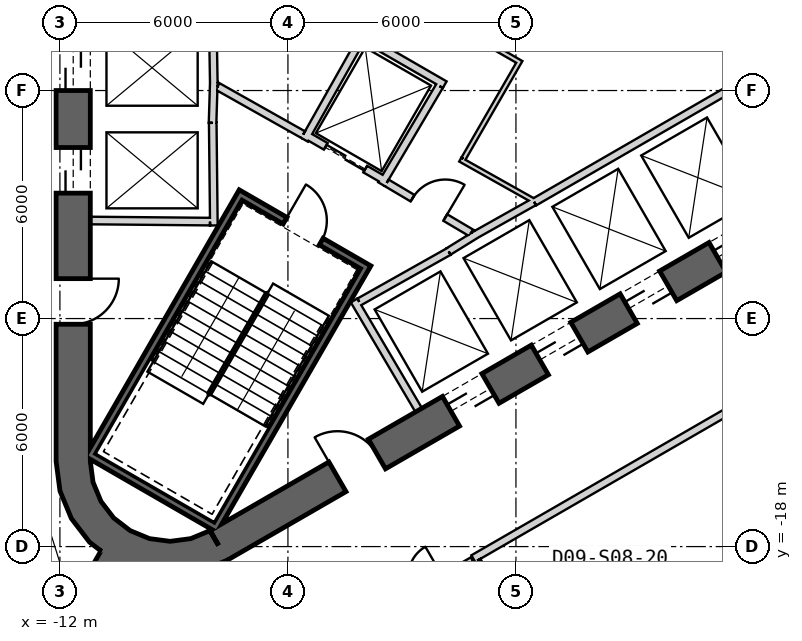
"""IFC4 building model, lengths in metres.
Left out: names, types, materials, properties, quantities, classifications, styles, units other than length and angle.
Written with IfcOpenShell. Run it as: python <this file> out.ifc"""

import sys

from ifc_helpers import new_model, si_unit, direction, frame, frame_2d, origin, place, context, subcontext, project, spatial, polyline, rectangle, outline, extrude, element, fill, save


model = new_model("IFC4")
c1 = context("Model", 3, precision=1e-05, world=origin(), true_north=direction((0.0, 1.0)))
c2 = subcontext(c1, "Body", "Model", "MODEL_VIEW")
j1 = project(units=[si_unit("LENGTHUNIT", "METRE"), si_unit("PLANEANGLEUNIT", "RADIAN")], contexts=[c1])
p1 = place(None, origin())
s1 = spatial("IfcSite", under=j1, at=p1, CompositionType="ELEMENT")
p2 = place(p1, origin())
s2 = spatial("IfcBuilding", under=s1, at=p2, CompositionType="ELEMENT")
p3 = place(p2, frame((0.0, 0.0, 143.9)))
s3 = spatial("IfcBuildingStorey", under=s2, at=p3, CompositionType="ELEMENT", Elevation=143.9)
p4 = place(p3, frame((-11.65, 15.762, 0.0), z_axis=(0.0, 0.0, 1.0), x_axis=(0.0, -1.0, 0.0)))
e1 = element("IfcWall", 1, at=p4, inside=s3, PredefinedType="SHEAR", context=c2, shape_type="SweptSolid", body=[
    extrude(rectangle(XDim=31.523, YDim=0.9, at=frame_2d((15.762, 0.0))), origin(), (0.0, 0.0, 1.0), 4.1),
])
p5 = place(p4, frame((7.062, 0.0, 0.0)))
e2 = element("IfcOpeningElement", 2, at=p5, cuts=e1, PredefinedType="OPENING", context=c2, shape_type="SweptSolid", body=[
    extrude(rectangle(XDim=1.2, YDim=2.4, at=frame_2d((0.6, 1.2))), frame((0.0, 0.46, 0.0), z_axis=(0.0, -1.0, 0.0), x_axis=(1.0, 0.0, 0.0)), (0.0, 0.0, 1.0), 0.92),
])
p6 = place(p4, frame((9.762, 0.0, 0.0)))
e3 = element("IfcOpeningElement", 3, at=p6, cuts=e1, PredefinedType="OPENING", context=c2, shape_type="SweptSolid", body=[
    extrude(rectangle(XDim=1.2, YDim=2.4, at=frame_2d((0.6, 1.2))), frame((0.0, 0.46, 0.0), z_axis=(0.0, -1.0, 0.0), x_axis=(1.0, 0.0, 0.0)), (0.0, 0.0, 1.0), 0.92),
])
p7 = place(p4, frame((12.462, 0.0, 0.0)))
e4 = element("IfcOpeningElement", 4, at=p7, cuts=e1, PredefinedType="OPENING", context=c2, shape_type="SweptSolid", body=[
    extrude(rectangle(XDim=1.2, YDim=2.4, at=frame_2d((0.6, 1.2))), frame((0.0, 0.46, 0.0), z_axis=(0.0, -1.0, 0.0), x_axis=(1.0, 0.0, 0.0)), (0.0, 0.0, 1.0), 0.92),
])
p8 = place(p4, frame((15.162, 0.0, 0.0)))
e5 = element("IfcOpeningElement", 5, at=p8, cuts=e1, PredefinedType="OPENING", context=c2, shape_type="SweptSolid", body=[
    extrude(rectangle(XDim=1.2, YDim=2.4, at=frame_2d((0.6, 1.2))), frame((0.0, 0.46, 0.0), z_axis=(0.0, -1.0, 0.0), x_axis=(1.0, 0.0, 0.0)), (0.0, 0.0, 1.0), 0.92),
])
p9 = place(p4, frame((17.862, 0.0, 0.0)))
e6 = element("IfcOpeningElement", 6, at=p9, cuts=e1, PredefinedType="OPENING", context=c2, shape_type="SweptSolid", body=[
    extrude(rectangle(XDim=1.2, YDim=2.4, at=frame_2d((0.6, 1.2))), frame((0.0, 0.46, 0.0), z_axis=(0.0, -1.0, 0.0), x_axis=(1.0, 0.0, 0.0)), (0.0, 0.0, 1.0), 0.92),
])
p10 = place(p4, frame((20.562, 0.0, 0.0)))
e7 = element("IfcOpeningElement", 7, at=p10, cuts=e1, PredefinedType="OPENING", context=c2, shape_type="SweptSolid", body=[
    extrude(rectangle(XDim=1.2, YDim=2.4, at=frame_2d((0.6, 1.2))), frame((0.0, 0.46, 0.0), z_axis=(0.0, -1.0, 0.0), x_axis=(1.0, 0.0, 0.0)), (0.0, 0.0, 1.0), 0.92),
])
p11 = place(p4, frame((23.262, 0.0, 0.0)))
e8 = element("IfcOpeningElement", 8, at=p11, cuts=e1, PredefinedType="OPENING", context=c2, shape_type="SweptSolid", body=[
    extrude(rectangle(XDim=1.2, YDim=2.4, at=frame_2d((0.6, 1.2))), frame((0.0, 0.46, 0.0), z_axis=(0.0, -1.0, 0.0), x_axis=(1.0, 0.0, 0.0)), (0.0, 0.0, 1.0), 0.92),
])
p12 = place(p4, frame((3.612, 0.0, 0.0)))
e9 = element("IfcOpeningElement", 9, at=p12, cuts=e1, PredefinedType="OPENING", context=c2, shape_type="SweptSolid", body=[
    extrude(rectangle(XDim=1.2, YDim=2.4, at=frame_2d((0.6, 1.2))), frame((0.0, 0.46, 0.0), z_axis=(0.0, -1.0, 0.0), x_axis=(1.0, 0.0, 0.0)), (0.0, 0.0, 1.0), 0.92),
])
p13 = place(p4, frame((26.712, 0.0, 0.0)))
e10 = element("IfcOpeningElement", 10, at=p13, cuts=e1, PredefinedType="OPENING", context=c2, shape_type="SweptSolid", body=[
    extrude(rectangle(XDim=1.2, YDim=2.4, at=frame_2d((0.6, 1.2))), frame((0.0, 0.46, 0.0), z_axis=(0.0, -1.0, 0.0), x_axis=(1.0, 0.0, 0.0)), (0.0, 0.0, 1.0), 0.92),
])
p14 = place(p3, frame((-7.825, -17.97, 0.0), z_axis=(0.0, 0.0, 1.0), x_axis=(0.866028369851, 0.499994862586, 0.0)))
e11 = element("IfcWall", 11, at=p14, inside=s3, PredefinedType="SHEAR", context=c2, shape_type="SweptSolid", body=[
    extrude(rectangle(XDim=31.523, YDim=0.9, at=frame_2d((15.762, 0.0))), origin(), (0.0, 0.0, 1.0), 4.1),
])
p15 = place(p14, frame((7.062, 0.0, 0.0)))
e12 = element("IfcOpeningElement", 12, at=p15, cuts=e11, PredefinedType="OPENING", context=c2, shape_type="SweptSolid", body=[
    extrude(rectangle(XDim=1.2, YDim=2.4, at=frame_2d((0.6, 1.2))), frame((0.0, 0.46, 0.0), z_axis=(0.0, -1.0, 0.0), x_axis=(1.0, 0.0, 0.0)), (0.0, 0.0, 1.0), 0.92),
])
p16 = place(p14, frame((9.762, 0.0, 0.0)))
e13 = element("IfcOpeningElement", 13, at=p16, cuts=e11, PredefinedType="OPENING", context=c2, shape_type="SweptSolid", body=[
    extrude(rectangle(XDim=1.2, YDim=2.4, at=frame_2d((0.6, 1.2))), frame((0.0, 0.46, 0.0), z_axis=(0.0, -1.0, 0.0), x_axis=(1.0, 0.0, 0.0)), (0.0, 0.0, 1.0), 0.92),
])
p17 = place(p14, frame((12.462, 0.0, 0.0)))
e14 = element("IfcOpeningElement", 14, at=p17, cuts=e11, PredefinedType="OPENING", context=c2, shape_type="SweptSolid", body=[
    extrude(rectangle(XDim=1.2, YDim=2.4, at=frame_2d((0.6, 1.2))), frame((0.0, 0.46, 0.0), z_axis=(0.0, -1.0, 0.0), x_axis=(1.0, 0.0, 0.0)), (0.0, 0.0, 1.0), 0.92),
])
p18 = place(p14, frame((15.162, 0.0, 0.0)))
e15 = element("IfcOpeningElement", 15, at=p18, cuts=e11, PredefinedType="OPENING", context=c2, shape_type="SweptSolid", body=[
    extrude(rectangle(XDim=1.2, YDim=2.4, at=frame_2d((0.6, 1.2))), frame((0.0, 0.46, 0.0), z_axis=(0.0, -1.0, 0.0), x_axis=(1.0, 0.0, 0.0)), (0.0, 0.0, 1.0), 0.92),
])
p19 = place(p14, frame((17.862, 0.0, 0.0)))
e16 = element("IfcOpeningElement", 16, at=p19, cuts=e11, PredefinedType="OPENING", context=c2, shape_type="SweptSolid", body=[
    extrude(rectangle(XDim=1.2, YDim=2.4, at=frame_2d((0.6, 1.2))), frame((0.0, 0.46, 0.0), z_axis=(0.0, -1.0, 0.0), x_axis=(1.0, 0.0, 0.0)), (0.0, 0.0, 1.0), 0.92),
])
p20 = place(p14, frame((20.562, 0.0, 0.0)))
e17 = element("IfcOpeningElement", 17, at=p20, cuts=e11, PredefinedType="OPENING", context=c2, shape_type="SweptSolid", body=[
    extrude(rectangle(XDim=1.2, YDim=2.4, at=frame_2d((0.6, 1.2))), frame((0.0, 0.46, 0.0), z_axis=(0.0, -1.0, 0.0), x_axis=(1.0, 0.0, 0.0)), (0.0, 0.0, 1.0), 0.92),
])
p21 = place(p14, frame((26.712, 0.0, 0.0)))
e18 = element("IfcOpeningElement", 18, at=p21, cuts=e11, PredefinedType="OPENING", context=c2, shape_type="SweptSolid", body=[
    extrude(rectangle(XDim=1.2, YDim=2.4, at=frame_2d((0.6, 1.2))), frame((0.0, 0.46, 0.0), z_axis=(0.0, -1.0, 0.0), x_axis=(1.0, 0.0, 0.0)), (0.0, 0.0, 1.0), 0.92),
])
p22 = place(p14, frame((3.612, 0.0, 0.0)))
e19 = element("IfcOpeningElement", 19, at=p22, cuts=e11, PredefinedType="OPENING", context=c2, shape_type="SweptSolid", body=[
    extrude(rectangle(XDim=1.2, YDim=2.4, at=frame_2d((0.6, 1.2))), frame((0.0, 0.46, 0.0), z_axis=(0.0, -1.0, 0.0), x_axis=(1.0, 0.0, 0.0)), (0.0, 0.0, 1.0), 0.92),
])
p23 = place(p3, origin())
e20 = element("IfcWall", 20, at=p23, inside=s3, PredefinedType="SHEAR", context=c2, shape_type="SweptSolid", body=[
    extrude(outline(polyline([(-12.1, -15.762), (-11.998, -16.538), (-11.698, -17.262), (-11.221, -17.883), (-10.6, -18.36), (-9.876, -18.659), (-9.1, -18.762), (-8.323, -18.659), (-7.6, -18.36), (-8.05, -17.58), (-8.556, -17.79), (-9.1, -17.862), (-9.644, -17.79), (-10.15, -17.58), (-10.585, -17.247), (-10.919, -16.812), (-11.128, -16.305), (-11.2, -15.762), (-12.1, -15.762)])), origin(), (0.0, 0.0, 1.0), 4.1),
])
p24 = place(p3, frame((-10.575, -18.316, 0.0), z_axis=(0.0, 0.0, 1.0), x_axis=(-0.500002326941, -0.86602406032, 0.0)))
e21 = element("IfcWall", 21, at=p24, inside=s3, PredefinedType="SHEAR", context=c2, shape_type="SweptSolid", body=[
    extrude(rectangle(XDim=12.384, YDim=0.8, at=frame_2d((6.192, 0.0))), origin(), (0.0, 0.0, 1.0), 4.1),
])
p25 = place(p24, frame((1.25, 0.0, 0.0)))
e22 = element("IfcOpeningElement", 22, at=p25, cuts=e21, PredefinedType="OPENING", context=c2, shape_type="SweptSolid", body=[
    extrude(rectangle(XDim=1.4, YDim=2.4, at=frame_2d((0.7, 1.2))), frame((0.0, 0.41, 0.0), z_axis=(0.0, -1.0, 0.0), x_axis=(1.0, 0.0, 0.0)), (0.0, 0.0, 1.0), 0.82),
])
p26 = place(p3, frame((-7.95, -5.772, 0.0), z_axis=(0.0, 0.0, 1.0), x_axis=(-0.030803413295, -0.999525462272, 0.0)))
e23 = element("IfcWall", 23, at=p26, inside=s3, PredefinedType="PLUMBINGWALL", context=c2, shape_type="SweptSolid", body=[
    extrude(rectangle(XDim=1.078, YDim=0.2, at=frame_2d((0.539, 0.0))), origin(), (0.0, 0.0, 1.0), 3.8),
])
p27 = place(p3, frame((-7.98, -4.05, 0.0), z_axis=(0.0, 0.0, 1.0), x_axis=(0.016809909365, -0.999858703491, 0.0)))
e24 = element("IfcWall", 24, at=p27, inside=s3, PredefinedType="PLUMBINGWALL", context=c2, shape_type="SweptSolid", body=[
    extrude(rectangle(XDim=1.844, YDim=0.2, at=frame_2d((0.922, 0.0))), origin(), (0.0, 0.0, 1.0), 3.8),
])
p28 = place(p3, frame((-7.979, -6.85, 0.0), z_axis=(0.0, 0.0, 1.0), x_axis=(0.011121475088, -0.999938154483, 0.0)))
e25 = element("IfcWall", 25, at=p28, inside=s3, PredefinedType="PLUMBINGWALL", context=c2, shape_type="SweptSolid", body=[
    extrude(rectangle(XDim=2.7, YDim=0.2, at=frame_2d((1.35, 0.0))), origin(), (0.0, 0.0, 1.0), 3.8),
])
p29 = place(p3, frame((-8.05, -9.449, 0.0), z_axis=(0.0, 0.0, 1.0), x_axis=(-0.999957467379, 0.009222983926, 0.0)))
e26 = element("IfcWall", 26, at=p29, inside=s3, PredefinedType="PLUMBINGWALL", context=c2, shape_type="SweptSolid", body=[
    extrude(rectangle(XDim=3.15, YDim=0.2, at=frame_2d((1.575, 0.0))), origin(), (0.0, 0.0, 1.0), 3.8),
])
p30 = place(p3, frame((0.483, -8.936, 0.0), z_axis=(0.0, 0.0, 1.0), x_axis=(0.866030989016, 0.499990325971, 0.0)))
e27 = element("IfcWall", 27, at=p30, inside=s3, PredefinedType="PLUMBINGWALL", context=c2, shape_type="SweptSolid", body=[
    extrude(rectangle(XDim=8.1, YDim=0.2, at=frame_2d((4.05, 0.0))), origin(), (0.0, 0.0, 1.0), 3.8),
])
p31 = place(p3, frame((-2.558, -14.409, 0.0), z_axis=(0.0, 0.0, 1.0), x_axis=(-0.507997497166, 0.861358544901, 0.0)))
e28 = element("IfcWall", 28, at=p31, inside=s3, PredefinedType="PLUMBINGWALL", context=c2, shape_type="SweptSolid", body=[
    extrude(rectangle(XDim=3.35, YDim=0.2, at=frame_2d((1.675, 0.0))), origin(), (0.0, 0.0, 1.0), 3.8),
])
p32 = place(p3, frame((-1.769, -10.237, 0.0), z_axis=(0.0, 0.0, 1.0), x_axis=(-0.871534483978, -0.490334215854, 0.0)))
e29 = element("IfcWall", 29, at=p32, inside=s3, PredefinedType="PLUMBINGWALL", context=c2, shape_type="SweptSolid", body=[
    extrude(rectangle(XDim=2.7, YDim=0.2, at=frame_2d((1.35, 0.0))), origin(), (0.0, 0.0, 1.0), 3.8),
])
p33 = place(p3, frame((-1.024, -9.771, 0.0), z_axis=(0.0, 0.0, 1.0), x_axis=(-0.850348075135, -0.526220629693, 0.0)))
e30 = element("IfcWall", 30, at=p33, inside=s3, PredefinedType="PLUMBINGWALL", context=c2, shape_type="SweptSolid", body=[
    extrude(rectangle(XDim=0.878, YDim=0.2, at=frame_2d((0.439, 0.0))), origin(), (0.0, 0.0, 1.0), 3.8),
])
p34 = place(p3, frame((-1.13, -9.832, 0.0), z_axis=(0.0, 0.0, 1.0), x_axis=(0.871988740738, 0.489525929882, 0.0)))
e31 = element("IfcWall", 31, at=p34, inside=s3, PredefinedType="PLUMBINGWALL", context=c2, shape_type="SweptSolid", body=[
    extrude(rectangle(XDim=1.845, YDim=0.2, at=frame_2d((0.922, 0.0))), origin(), (0.0, 0.0, 1.0), 3.8),
])
p35 = place(p3, frame((-3.905, -10.563, -0.3), z_axis=(0.0, 0.0, 1.0), x_axis=(-0.500012932018, -0.866017937352, 0.0)))
e32 = element("IfcWall", 32, at=p35, inside=s3, PredefinedType="SHEAR", context=c2, shape_type="SweptSolid", body=[
    extrude(rectangle(XDim=8.1, YDim=0.2, at=frame_2d((4.05, 0.0))), origin(), (0.0, 0.0, 1.0), 4.1),
])
p36 = place(p3, frame((-11.282, -15.541, -0.3), z_axis=(0.0, 0.0, 1.0), x_axis=(0.866000483506, -0.500043160704, 0.0)))
e33 = element("IfcWall", 33, at=p36, inside=s3, PredefinedType="SHEAR", context=c2, shape_type="SweptSolid", body=[
    extrude(rectangle(XDim=3.8, YDim=0.2, at=frame_2d((1.9, 0.0))), origin(), (0.0, 0.0, 1.0), 4.1),
])
p37 = place(p3, frame((-7.196, -8.663, -0.3), z_axis=(0.0, 0.0, 1.0), x_axis=(-0.499997992926, -0.866026562566, 0.0)))
e34 = element("IfcWall", 34, at=p37, inside=s3, PredefinedType="SHEAR", context=c2, shape_type="SweptSolid", body=[
    extrude(rectangle(XDim=7.9, YDim=0.2, at=frame_2d((3.95, 0.0))), origin(), (0.0, 0.0, 1.0), 4.1),
])
p38 = place(p3, frame((-4.041, -10.599, -0.3), z_axis=(0.0, 0.0, 1.0), x_axis=(-0.866047807691, 0.499961193289, 0.0)))
e35 = element("IfcWall", 35, at=p38, inside=s3, PredefinedType="SHEAR", context=c2, shape_type="SweptSolid", body=[
    extrude(rectangle(XDim=3.6, YDim=0.2, at=frame_2d((1.8, 0.0))), origin(), (0.0, 0.0, 1.0), 4.1),
])
p39 = place(p38, frame((1.25, 0.0, 0.3)))
e36 = element("IfcOpeningElement", 36, at=p39, cuts=e35, PredefinedType="OPENING", context=c2, shape_type="SweptSolid", body=[
    extrude(rectangle(XDim=1.1, YDim=2.1, at=frame_2d((0.55, 1.05))), frame((0.0, 0.11, 0.0), z_axis=(0.0, -1.0, 0.0), x_axis=(1.0, 0.0, 0.0)), (0.0, 0.0, 1.0), 0.22),
])
p40 = place(p3, frame((-3.446, -8.368, 0.0), z_axis=(0.0, 0.0, 1.0), x_axis=(-0.866024647952, 0.500001309137, 0.0)))
e37 = element("IfcWall", 37, at=p40, inside=s3, PredefinedType="PLUMBINGWALL", context=c2, shape_type="SweptSolid", body=[
    extrude(rectangle(XDim=2.4, YDim=0.2, at=frame_2d((1.2, 0.0))), origin(), (0.0, 0.0, 1.0), 3.8),
])
p41 = place(p40, frame((0.6, 0.0, 0.0)))
e38 = element("IfcOpeningElement", 38, at=p41, cuts=e37, PredefinedType="OPENING", context=c2, shape_type="SweptSolid", body=[
    extrude(rectangle(XDim=1.2, YDim=2.4, at=frame_2d((0.6, 1.2))), frame((0.0, 0.11, 0.0), z_axis=(0.0, -1.0, 0.0), x_axis=(1.0, 0.0, 0.0)), (0.0, 0.0, 1.0), 0.22),
])
p42 = place(p3, frame((-5.562, -7.296, 0.0), z_axis=(0.0, 0.0, 1.0), x_axis=(0.491322718731, 0.870977603649, 0.0)))
e39 = element("IfcWall", 39, at=p42, inside=s3, PredefinedType="PLUMBINGWALL", context=c2, shape_type="SweptSolid", body=[
    extrude(rectangle(XDim=3.1, YDim=0.2, at=frame_2d((1.55, 0.0))), origin(), (0.0, 0.0, 1.0), 3.8),
])
p43 = place(p3, frame((-4.021, -4.606, 0.0), z_axis=(0.0, 0.0, 1.0), x_axis=(0.866016689309, -0.500015093611, 0.0)))
e40 = element("IfcWall", 40, at=p43, inside=s3, PredefinedType="PLUMBINGWALL", context=c2, shape_type="SweptSolid", body=[
    extrude(rectangle(XDim=2.479, YDim=0.2, at=frame_2d((1.24, 0.0))), origin(), (0.0, 0.0, 1.0), 3.8),
])
p44 = place(p3, frame((-2.012, -5.882, 0.0), z_axis=(0.0, 0.0, 1.0), x_axis=(-0.508619639323, -0.860991325447, 0.0)))
e41 = element("IfcWall", 41, at=p44, inside=s3, PredefinedType="PLUMBINGWALL", context=c2, shape_type="SweptSolid", body=[
    extrude(rectangle(XDim=3.0, YDim=0.2, at=frame_2d((1.5, 0.0))), origin(), (0.0, 0.0, 1.0), 3.8),
])
p45 = place(p3, frame((-7.849, -5.894, 0.0), z_axis=(0.0, 0.0, 1.0), x_axis=(0.871340486379, -0.490678873396, 0.0)))
e42 = element("IfcWall", 42, at=p45, inside=s3, PredefinedType="PARTITIONING", context=c2, shape_type="SweptSolid", body=[
    extrude(rectangle(XDim=2.581, YDim=0.2, at=frame_2d((1.291, 0.0))), origin(), (0.0, 0.0, 1.0), 3.8),
])
p46 = place(p3, frame((-3.401, -8.43, 0.0), z_axis=(0.0, 0.0, 1.0), x_axis=(0.860598681535, -0.509283721849, 0.0)))
e43 = element("IfcWall", 43, at=p46, inside=s3, PredefinedType="PARTITIONING", context=c2, shape_type="SweptSolid", body=[
    extrude(rectangle(XDim=2.581, YDim=0.2, at=frame_2d((1.291, 0.0))), origin(), (0.0, 0.0, 1.0), 3.8),
])
p47 = place(p46, frame((0.791, 0.0, 0.0)))
e44 = element("IfcOpeningElement", 44, at=p47, cuts=e43, PredefinedType="OPENING", context=c2, shape_type="SweptSolid", body=[
    extrude(rectangle(XDim=1.0, YDim=2.1, at=frame_2d((0.5, 1.05))), frame((0.0, 0.11, 0.0), z_axis=(0.0, -1.0, 0.0), x_axis=(1.0, 0.0, 0.0)), (0.0, 0.0, 1.0), 0.22),
])
p48 = place(p3, frame((-1.464, -7.816, 0.0), z_axis=(0.0, 0.0, 1.0), x_axis=(0.871880202732, -0.489719217597, 0.0)))
e45 = element("IfcWall", 45, at=p48, inside=s3, PredefinedType="PARTITIONING", context=c2, shape_type="SweptSolid", body=[
    extrude(rectangle(XDim=2.224, YDim=0.12, at=frame_2d((1.112, 0.0))), origin(), (0.0, 0.0, 1.0), 3.8),
])
p49 = place(p3, frame((0.118, -5.195, 0.0), z_axis=(0.0, 0.0, 1.0), x_axis=(-0.499990139034, -0.866031096941, 0.0)))
e46 = element("IfcWall", 46, at=p49, inside=s3, PredefinedType="PARTITIONING", context=c2, shape_type="SweptSolid", body=[
    extrude(rectangle(XDim=3.0, YDim=0.12, at=frame_2d((1.5, 0.0))), origin(), (0.0, 0.0, 1.0), 3.8),
])
p50 = place(p3, frame((-1.371, -4.405, 0.0), z_axis=(0.0, 0.0, 1.0), x_axis=(0.866053003207, -0.499952193351, 0.0)))
e47 = element("IfcWall", 47, at=p50, inside=s3, PredefinedType="PARTITIONING", context=c2, shape_type="SweptSolid", body=[
    extrude(rectangle(XDim=1.625, YDim=0.12, at=frame_2d((0.812, 0.0))), origin(), (0.0, 0.0, 1.0), 3.8),
])
p51 = place(p3, frame((-1.123, -18.315, 0.0), z_axis=(0.0, 0.0, 1.0), x_axis=(0.866026561282, 0.49999799515, 0.0)))
e48 = element("IfcWall", 48, at=p51, inside=s3, PredefinedType="PARTITIONING", context=c2, shape_type="SweptSolid", body=[
    extrude(rectangle(XDim=26.435, YDim=0.2, at=frame_2d((13.218, 0.0))), origin(), (0.0, 0.0, 1.0), 2.98),
])
p52 = place(p51, frame((12.718, 0.0, 0.0)))
e49 = element("IfcOpeningElement", 49, at=p52, cuts=e48, PredefinedType="OPENING", context=c2, shape_type="SweptSolid", body=[
    extrude(rectangle(XDim=1.0, YDim=2.1, at=frame_2d((0.5, 1.05))), frame((0.0, 0.11, 0.0), z_axis=(0.0, -1.0, 0.0), x_axis=(1.0, 0.0, 0.0)), (0.0, 0.0, 1.0), 0.22),
])
p53 = place(p3, frame((-6.049, -21.159, 0.0), z_axis=(0.0, 0.0, 1.0), x_axis=(0.866040189422, 0.499974389651, 0.0)))
e50 = element("IfcWall", 50, at=p53, inside=s3, PredefinedType="PARTITIONING", context=c2, shape_type="SweptSolid", body=[
    extrude(rectangle(XDim=5.648, YDim=0.12, at=frame_2d((2.824, 0.0))), origin(), (0.0, 0.0, 1.0), 2.98),
])
p54 = place(p53, frame((3.852, 0.0, 0.0)))
e51 = element("IfcOpeningElement", 51, at=p54, cuts=e50, PredefinedType="OPENING", context=c2, shape_type="SweptSolid", body=[
    extrude(rectangle(XDim=0.9, YDim=2.1, at=frame_2d((0.45, 1.05))), frame((0.0, 0.07, 0.0), z_axis=(0.0, -1.0, 0.0), x_axis=(1.0, 0.0, 0.0)), (0.0, 0.0, 1.0), 0.14),
])
p55 = place(p53, frame((1.028, 0.0, 0.0)))
e52 = element("IfcOpeningElement", 52, at=p55, cuts=e50, PredefinedType="OPENING", context=c2, shape_type="SweptSolid", body=[
    extrude(rectangle(XDim=0.9, YDim=2.1, at=frame_2d((0.45, 1.05))), frame((0.0, 0.07, 0.0), z_axis=(0.0, -1.0, 0.0), x_axis=(1.0, 0.0, 0.0)), (0.0, 0.0, 1.0), 0.14),
])
p56 = place(p3, frame((-1.021, -18.372, 0.0), z_axis=(0.0, 0.0, 1.0), x_axis=(0.493366643235, -0.869821450266, 0.0)))
e53 = element("IfcWall", 53, at=p56, inside=s3, PredefinedType="PARTITIONING", context=c2, shape_type="SweptSolid", body=[
    extrude(rectangle(XDim=3.74, YDim=0.2, at=frame_2d((1.87, 0.0))), origin(), (0.0, 0.0, 1.0), 3.08),
])
p57 = place(p39, origin())
e54 = element("IfcDoor", 54, at=p57, inside=s3, OperationType="SINGLE_SWING_RIGHT", PredefinedType="USERDEFINED", context=c2, shape_type="SweptSolid", body=[
    extrude(rectangle(XDim=1.1, YDim=2.1, at=frame_2d((0.55, 1.05))), frame((0.0, 0.025, 0.0), z_axis=(0.0, -1.0, 0.0), x_axis=(1.0, 0.0, 0.0)), (0.0, 0.0, 1.0), 0.05),
])
fill(e36, e54)
p58 = place(p47, origin())
e55 = element("IfcDoor", 55, at=p58, inside=s3, OperationType="SINGLE_SWING_RIGHT", PredefinedType="USERDEFINED", context=c2, shape_type="SweptSolid", body=[
    extrude(rectangle(XDim=1.0, YDim=2.1, at=frame_2d((0.5, 1.05))), frame((0.0, 0.025, 0.0), z_axis=(0.0, -1.0, 0.0), x_axis=(1.0, 0.0, 0.0)), (0.0, 0.0, 1.0), 0.05),
])
fill(e44, e55)
p59 = place(p41, origin())
e56 = element("IfcDoor", 56, at=p59, inside=s3, OperationType="SLIDING_TO_LEFT", PredefinedType="USERDEFINED", context=c2, shape_type="SweptSolid", body=[
    extrude(rectangle(XDim=1.2, YDim=2.4, at=frame_2d((0.6, 1.2))), frame((0.0, 0.025, 0.0), z_axis=(0.0, -1.0, 0.0), x_axis=(1.0, 0.0, 0.0)), (0.0, 0.0, 1.0), 0.05),
])
fill(e38, e56)
p60 = place(p10, origin())
e57 = element("IfcDoor", 57, at=p60, inside=s3, OperationType="SLIDING_TO_LEFT", PredefinedType="USERDEFINED", context=c2, shape_type="SweptSolid", body=[
    extrude(rectangle(XDim=1.2, YDim=2.4, at=frame_2d((0.6, 1.2))), frame((0.0, 0.025, 0.0), z_axis=(0.0, -1.0, 0.0), x_axis=(1.0, 0.0, 0.0)), (0.0, 0.0, 1.0), 0.05),
])
fill(e7, e57)
p61 = place(p11, origin())
e58 = element("IfcDoor", 58, at=p61, inside=s3, OperationType="SLIDING_TO_LEFT", PredefinedType="USERDEFINED", context=c2, shape_type="SweptSolid", body=[
    extrude(rectangle(XDim=1.2, YDim=2.4, at=frame_2d((0.6, 1.2))), frame((0.0, 0.025, 0.0), z_axis=(0.0, -1.0, 0.0), x_axis=(1.0, 0.0, 0.0)), (0.0, 0.0, 1.0), 0.05),
])
fill(e8, e58)
p62 = place(p15, origin())
e59 = element("IfcDoor", 59, at=p62, inside=s3, OperationType="SLIDING_TO_LEFT", PredefinedType="USERDEFINED", context=c2, shape_type="SweptSolid", body=[
    extrude(rectangle(XDim=1.2, YDim=2.4, at=frame_2d((0.6, 1.2))), frame((0.0, 0.025, 0.0), z_axis=(0.0, -1.0, 0.0), x_axis=(1.0, 0.0, 0.0)), (0.0, 0.0, 1.0), 0.05),
])
fill(e12, e59)
p63 = place(p16, origin())
e60 = element("IfcDoor", 60, at=p63, inside=s3, OperationType="SLIDING_TO_LEFT", PredefinedType="USERDEFINED", context=c2, shape_type="SweptSolid", body=[
    extrude(rectangle(XDim=1.2, YDim=2.4, at=frame_2d((0.6, 1.2))), frame((0.0, 0.025, 0.0), z_axis=(0.0, -1.0, 0.0), x_axis=(1.0, 0.0, 0.0)), (0.0, 0.0, 1.0), 0.05),
])
fill(e13, e60)
p64 = place(p17, origin())
e61 = element("IfcDoor", 61, at=p64, inside=s3, OperationType="SLIDING_TO_LEFT", PredefinedType="USERDEFINED", context=c2, shape_type="SweptSolid", body=[
    extrude(rectangle(XDim=1.2, YDim=2.4, at=frame_2d((0.6, 1.2))), frame((0.0, 0.025, 0.0), z_axis=(0.0, -1.0, 0.0), x_axis=(1.0, 0.0, 0.0)), (0.0, 0.0, 1.0), 0.05),
])
fill(e14, e61)
p65 = place(p18, origin())
e62 = element("IfcDoor", 62, at=p65, inside=s3, OperationType="SLIDING_TO_LEFT", PredefinedType="USERDEFINED", context=c2, shape_type="SweptSolid", body=[
    extrude(rectangle(XDim=1.2, YDim=2.4, at=frame_2d((0.6, 1.2))), frame((0.0, 0.025, 0.0), z_axis=(0.0, -1.0, 0.0), x_axis=(1.0, 0.0, 0.0)), (0.0, 0.0, 1.0), 0.05),
])
fill(e15, e62)
p66 = place(p13, origin())
e63 = element("IfcDoor", 63, at=p66, inside=s3, OperationType="SINGLE_SWING_RIGHT", PredefinedType="USERDEFINED", context=c2, shape_type="SweptSolid", body=[
    extrude(rectangle(XDim=1.2, YDim=2.4, at=frame_2d((0.6, 1.2))), frame((0.0, 0.025, 0.0), z_axis=(0.0, -1.0, 0.0), x_axis=(1.0, 0.0, 0.0)), (0.0, 0.0, 1.0), 0.05),
])
fill(e10, e63)
p67 = place(p22, origin())
e64 = element("IfcDoor", 64, at=p67, inside=s3, OperationType="SINGLE_SWING_RIGHT", PredefinedType="USERDEFINED", context=c2, shape_type="SweptSolid", body=[
    extrude(rectangle(XDim=1.2, YDim=2.4, at=frame_2d((0.6, 1.2))), frame((0.0, 0.025, 0.0), z_axis=(0.0, -1.0, 0.0), x_axis=(1.0, 0.0, 0.0)), (0.0, 0.0, 1.0), 0.05),
])
fill(e19, e64)
save(model, sys.argv[1])
